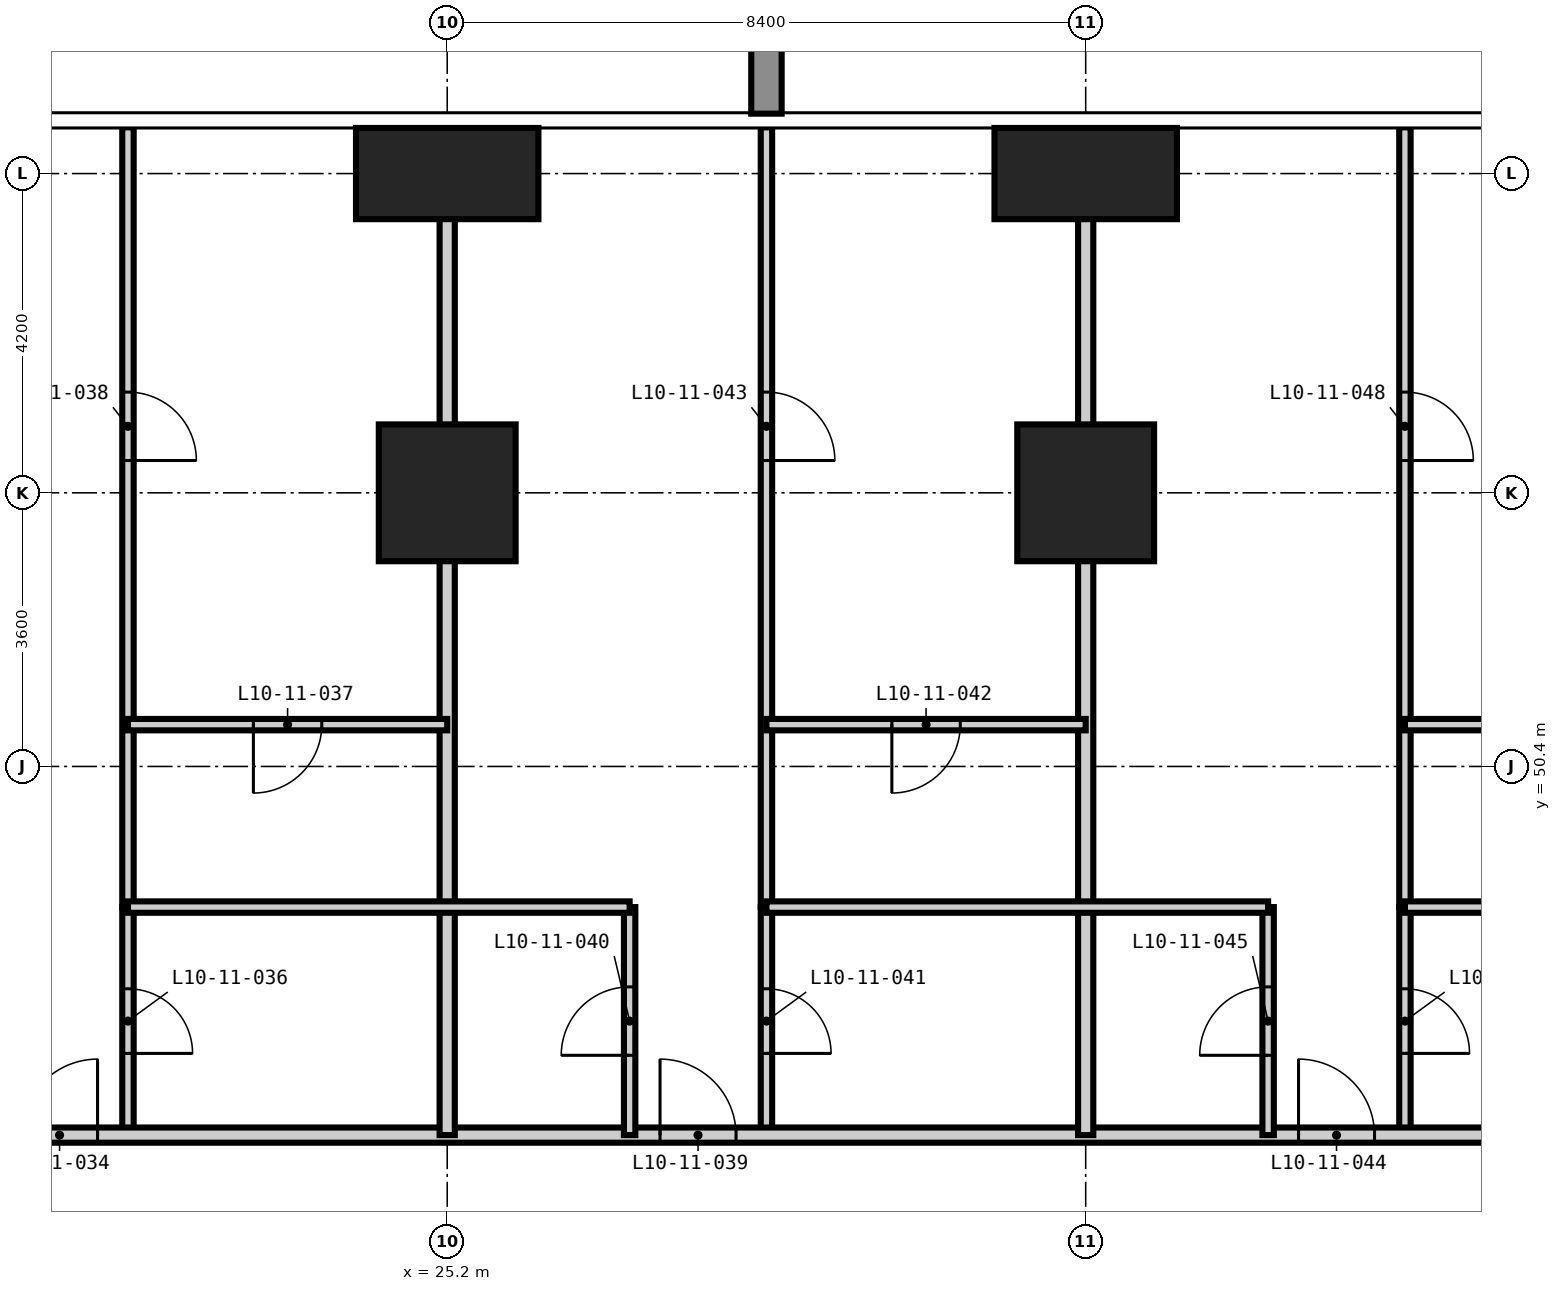
"""IFC4 building model, lengths in metres.
Left out: names, types, materials, properties, quantities, classifications, styles, units other than length and angle.
Written with IfcOpenShell. Run it as: python <this file> out.ifc"""

import sys

from ifc_helpers import new_model, si_unit, direction, frame, frame_2d, origin, origin_2d, place, context, subcontext, project, spatial, rectangle, extrude, element, fill, save


model = new_model("IFC4")
c1 = context("Model", 3, precision=1e-05, world=origin(), true_north=direction((0.0, 1.0)))
c2 = subcontext(c1, "Body", "Model", "MODEL_VIEW")
j1 = project(units=[si_unit("LENGTHUNIT", "METRE"), si_unit("PLANEANGLEUNIT", "RADIAN")], contexts=[c1])
p1 = place(None, origin())
s1 = spatial("IfcSite", under=j1, at=p1, CompositionType="ELEMENT")
p2 = place(p1, origin())
s2 = spatial("IfcBuilding", under=s1, at=p2, CompositionType="ELEMENT")
p3 = place(p2, frame((0.0, 0.0, 45.0)))
s3 = spatial("IfcBuildingStorey", under=s2, at=p3, CompositionType="ELEMENT", Elevation=45.0)
p4 = place(p3, frame((25.2, 54.0, -0.35), z_axis=(0.0, 0.0, 1.0), x_axis=(1.0, 0.0, 0.0)))
e1 = element("IfcColumn", 1, at=p4, inside=s3, PredefinedType="COLUMN", context=c2, shape_type="SweptSolid", body=[
    extrude(rectangle(XDim=1.8, YDim=1.8, at=origin_2d()), origin(), (0.0, 0.0, 1.0), 3.6),
])
p5 = place(p3, frame((25.2, 58.2, -0.35), z_axis=(0.0, 0.0, 1.0), x_axis=(1.0, 0.0, 0.0)))
e2 = element("IfcColumn", 2, at=p5, inside=s3, PredefinedType="COLUMN", context=c2, shape_type="SweptSolid", body=[
    extrude(rectangle(XDim=2.4, YDim=1.2, at=origin_2d()), origin(), (0.0, 0.0, 1.0), 3.6),
])
p6 = place(p3, frame((33.6, 54.0, -0.35), z_axis=(0.0, 0.0, 1.0), x_axis=(1.0, 0.0, 0.0)))
e3 = element("IfcColumn", 3, at=p6, inside=s3, PredefinedType="COLUMN", context=c2, shape_type="SweptSolid", body=[
    extrude(rectangle(XDim=1.8, YDim=1.8, at=origin_2d()), origin(), (0.0, 0.0, 1.0), 3.6),
])
p7 = place(p3, frame((33.6, 58.2, -0.35), z_axis=(0.0, 0.0, 1.0), x_axis=(1.0, 0.0, 0.0)))
e4 = element("IfcColumn", 4, at=p7, inside=s3, PredefinedType="COLUMN", context=c2, shape_type="SweptSolid", body=[
    extrude(rectangle(XDim=2.4, YDim=1.2, at=origin_2d()), origin(), (0.0, 0.0, 1.0), 3.6),
])
p8 = place(p3, frame((21.0, 45.55, 0.0), z_axis=(0.0, 0.0, 1.0), x_axis=(0.0, 1.0, 0.0)))
e5 = element("IfcWall", 5, at=p8, inside=s3, PredefinedType="PARTITIONING", context=c2, shape_type="SweptSolid", body=[
    extrude(rectangle(XDim=3.0, YDim=0.15, at=frame_2d((1.5, 0.0))), origin(), (0.0, 0.0, 1.0), 3.25),
])
p9 = place(p8, frame((1.075, 0.0, 0.0)))
e6 = element("IfcOpeningElement", 6, at=p9, cuts=e5, PredefinedType="OPENING", context=c2, shape_type="SweptSolid", body=[
    extrude(rectangle(XDim=0.85, YDim=2.1, at=frame_2d((0.425, 1.05))), frame((0.0, 0.085, 0.0), z_axis=(0.0, -1.0, 0.0), x_axis=(1.0, 0.0, 0.0)), (0.0, 0.0, 1.0), 0.17),
])
p10 = place(p3, frame((29.4, 45.55, 0.0), z_axis=(0.0, 0.0, 1.0), x_axis=(0.0, 1.0, 0.0)))
e7 = element("IfcWall", 7, at=p10, inside=s3, PredefinedType="PARTITIONING", context=c2, shape_type="SweptSolid", body=[
    extrude(rectangle(XDim=3.0, YDim=0.15, at=frame_2d((1.5, 0.0))), origin(), (0.0, 0.0, 1.0), 3.25),
])
p11 = place(p10, frame((1.075, 0.0, 0.0)))
e8 = element("IfcOpeningElement", 8, at=p11, cuts=e7, PredefinedType="OPENING", context=c2, shape_type="SweptSolid", body=[
    extrude(rectangle(XDim=0.85, YDim=2.1, at=frame_2d((0.425, 1.05))), frame((0.0, 0.085, 0.0), z_axis=(0.0, -1.0, 0.0), x_axis=(1.0, 0.0, 0.0)), (0.0, 0.0, 1.0), 0.17),
])
p12 = place(p3, frame((37.8, 45.55, 0.0), z_axis=(0.0, 0.0, 1.0), x_axis=(0.0, 1.0, 0.0)))
e9 = element("IfcWall", 9, at=p12, inside=s3, PredefinedType="PARTITIONING", context=c2, shape_type="SweptSolid", body=[
    extrude(rectangle(XDim=3.0, YDim=0.15, at=frame_2d((1.5, 0.0))), origin(), (0.0, 0.0, 1.0), 3.25),
])
p13 = place(p12, frame((1.075, 0.0, 0.0)))
e10 = element("IfcOpeningElement", 10, at=p13, cuts=e9, PredefinedType="OPENING", context=c2, shape_type="SweptSolid", body=[
    extrude(rectangle(XDim=0.85, YDim=2.1, at=frame_2d((0.425, 1.05))), frame((0.0, 0.085, 0.0), z_axis=(0.0, -1.0, 0.0), x_axis=(1.0, 0.0, 0.0)), (0.0, 0.0, 1.0), 0.17),
])
p14 = place(p3, frame((12.95, 45.55, 0.0), z_axis=(0.0, 0.0, 1.0), x_axis=(1.0, 0.0, 0.0)))
e11 = element("IfcWall", 11, at=p14, inside=s3, PredefinedType="PARTITIONING", context=c2, shape_type="SweptSolid", body=[
    extrude(rectangle(XDim=32.3, YDim=0.2, at=frame_2d((16.15, 0.0))), origin(), (0.0, 0.0, 1.0), 3.25),
])
p15 = place(p14, frame((6.65, 0.0, 0.0)))
e12 = element("IfcOpeningElement", 12, at=p15, cuts=e11, PredefinedType="OPENING", context=c2, shape_type="SweptSolid", body=[
    extrude(rectangle(XDim=1.0, YDim=2.2, at=frame_2d((0.5, 1.1))), frame((0.0, 0.11, 0.0), z_axis=(0.0, -1.0, 0.0), x_axis=(1.0, 0.0, 0.0)), (0.0, 0.0, 1.0), 0.22),
])
p16 = place(p14, frame((15.05, 0.0, 0.0)))
e13 = element("IfcOpeningElement", 13, at=p16, cuts=e11, PredefinedType="OPENING", context=c2, shape_type="SweptSolid", body=[
    extrude(rectangle(XDim=1.0, YDim=2.2, at=frame_2d((0.5, 1.1))), frame((0.0, 0.11, 0.0), z_axis=(0.0, -1.0, 0.0), x_axis=(1.0, 0.0, 0.0)), (0.0, 0.0, 1.0), 0.22),
])
p17 = place(p14, frame((23.45, 0.0, 0.0)))
e14 = element("IfcOpeningElement", 14, at=p17, cuts=e11, PredefinedType="OPENING", context=c2, shape_type="SweptSolid", body=[
    extrude(rectangle(XDim=1.0, YDim=2.2, at=frame_2d((0.5, 1.1))), frame((0.0, 0.11, 0.0), z_axis=(0.0, -1.0, 0.0), x_axis=(1.0, 0.0, 0.0)), (0.0, 0.0, 1.0), 0.22),
])
for number, where, z_axis, x_axis in (
    (15, (25.2, 45.55, 0.0), (0.0, 0.0, 1.0), (0.0, 1.0, 0.0)),
    (16, (33.6, 45.55, 0.0), (0.0, 0.0, 1.0), (0.0, 1.0, 0.0)),
):
    element("IfcWall", number, at=place(p3, frame(where, z_axis=z_axis, x_axis=x_axis)), inside=s3, PredefinedType="PARTITIONING", context=c2, shape_type="SweptSolid", body=[
        extrude(rectangle(XDim=13.258, YDim=0.2, at=frame_2d((6.629, 0.0))), origin(), (0.0, 0.0, 1.0), 3.25),
    ])
p18 = place(p3, frame((21.0, 48.55, 0.0), z_axis=(0.0, 0.0, 1.0), x_axis=(0.0, 1.0, 0.0)))
e17 = element("IfcWall", 17, at=p18, inside=s3, PredefinedType="PARTITIONING", context=c2, shape_type="SweptSolid", body=[
    extrude(rectangle(XDim=10.258, YDim=0.15, at=frame_2d((5.129, 0.0))), origin(), (0.0, 0.0, 1.0), 3.25),
])
p19 = place(p18, frame((5.875, 0.0, 0.0)))
e18 = element("IfcOpeningElement", 18, at=p19, cuts=e17, PredefinedType="OPENING", context=c2, shape_type="SweptSolid", body=[
    extrude(rectangle(XDim=0.9, YDim=2.1, at=frame_2d((0.45, 1.05))), frame((0.0, 0.085, 0.0), z_axis=(0.0, -1.0, 0.0), x_axis=(1.0, 0.0, 0.0)), (0.0, 0.0, 1.0), 0.17),
])
p20 = place(p3, frame((27.6, 45.55, 0.0), z_axis=(0.0, 0.0, 1.0), x_axis=(0.0, 1.0, 0.0)))
e19 = element("IfcWall", 19, at=p20, inside=s3, PredefinedType="PARTITIONING", context=c2, shape_type="SweptSolid", body=[
    extrude(rectangle(XDim=3.0, YDim=0.15, at=frame_2d((1.5, 0.0))), origin(), (0.0, 0.0, 1.0), 3.25),
])
p21 = place(p20, frame((1.05, 0.0, 0.0)))
e20 = element("IfcOpeningElement", 20, at=p21, cuts=e19, PredefinedType="OPENING", context=c2, shape_type="SweptSolid", body=[
    extrude(rectangle(XDim=0.9, YDim=2.1, at=frame_2d((0.45, 1.05))), frame((0.0, 0.085, 0.0), z_axis=(0.0, -1.0, 0.0), x_axis=(1.0, 0.0, 0.0)), (0.0, 0.0, 1.0), 0.17),
])
p22 = place(p3, frame((29.4, 48.55, 0.0), z_axis=(0.0, 0.0, 1.0), x_axis=(0.0, 1.0, 0.0)))
e21 = element("IfcWall", 21, at=p22, inside=s3, PredefinedType="PARTITIONING", context=c2, shape_type="SweptSolid", body=[
    extrude(rectangle(XDim=10.258, YDim=0.15, at=frame_2d((5.129, 0.0))), origin(), (0.0, 0.0, 1.0), 3.25),
])
p23 = place(p22, frame((5.875, 0.0, 0.0)))
e22 = element("IfcOpeningElement", 22, at=p23, cuts=e21, PredefinedType="OPENING", context=c2, shape_type="SweptSolid", body=[
    extrude(rectangle(XDim=0.9, YDim=2.1, at=frame_2d((0.45, 1.05))), frame((0.0, 0.085, 0.0), z_axis=(0.0, -1.0, 0.0), x_axis=(1.0, 0.0, 0.0)), (0.0, 0.0, 1.0), 0.17),
])
p24 = place(p3, frame((36.0, 45.55, 0.0), z_axis=(0.0, 0.0, 1.0), x_axis=(0.0, 1.0, 0.0)))
e23 = element("IfcWall", 23, at=p24, inside=s3, PredefinedType="PARTITIONING", context=c2, shape_type="SweptSolid", body=[
    extrude(rectangle(XDim=3.0, YDim=0.15, at=frame_2d((1.5, 0.0))), origin(), (0.0, 0.0, 1.0), 3.25),
])
p25 = place(p24, frame((1.05, 0.0, 0.0)))
e24 = element("IfcOpeningElement", 24, at=p25, cuts=e23, PredefinedType="OPENING", context=c2, shape_type="SweptSolid", body=[
    extrude(rectangle(XDim=0.9, YDim=2.1, at=frame_2d((0.45, 1.05))), frame((0.0, 0.085, 0.0), z_axis=(0.0, -1.0, 0.0), x_axis=(1.0, 0.0, 0.0)), (0.0, 0.0, 1.0), 0.17),
])
p26 = place(p3, frame((37.8, 48.55, 0.0), z_axis=(0.0, 0.0, 1.0), x_axis=(0.0, 1.0, 0.0)))
e25 = element("IfcWall", 25, at=p26, inside=s3, PredefinedType="PARTITIONING", context=c2, shape_type="SweptSolid", body=[
    extrude(rectangle(XDim=10.258, YDim=0.15, at=frame_2d((5.129, 0.0))), origin(), (0.0, 0.0, 1.0), 3.25),
])
p27 = place(p26, frame((5.875, 0.0, 0.0)))
e26 = element("IfcOpeningElement", 26, at=p27, cuts=e25, PredefinedType="OPENING", context=c2, shape_type="SweptSolid", body=[
    extrude(rectangle(XDim=0.9, YDim=2.1, at=frame_2d((0.45, 1.05))), frame((0.0, 0.085, 0.0), z_axis=(0.0, -1.0, 0.0), x_axis=(1.0, 0.0, 0.0)), (0.0, 0.0, 1.0), 0.17),
])
for number, where, z_axis, x_axis in (
    (27, (21.0, 48.55, 0.0), (0.0, 0.0, 1.0), (1.0, 0.0, 0.0)),
    (28, (29.4, 48.55, 0.0), (0.0, 0.0, 1.0), (1.0, 0.0, 0.0)),
):
    element("IfcWall", number, at=place(p3, frame(where, z_axis=z_axis, x_axis=x_axis)), inside=s3, PredefinedType="PARTITIONING", context=c2, shape_type="SweptSolid", body=[
        extrude(rectangle(XDim=6.6, YDim=0.15, at=frame_2d((3.3, 0.0))), origin(), (0.0, 0.0, 1.0), 3.25),
    ])
p28 = place(p3, frame((37.8, 48.55, 0.0), z_axis=(0.0, 0.0, 1.0), x_axis=(1.0, 0.0, 0.0)))
e29 = element("IfcWall", 29, at=p28, inside=s3, PredefinedType="PARTITIONING", context=c2, shape_type="SweptSolid", body=[
    extrude(rectangle(XDim=4.2, YDim=0.15, at=frame_2d((2.1, 0.0))), origin(), (0.0, 0.0, 1.0), 3.25),
])
p29 = place(p3, frame((21.0, 50.95, 0.0), z_axis=(0.0, 0.0, 1.0), x_axis=(1.0, 0.0, 0.0)))
e30 = element("IfcWall", 30, at=p29, inside=s3, PredefinedType="PARTITIONING", context=c2, shape_type="SweptSolid", body=[
    extrude(rectangle(XDim=4.2, YDim=0.15, at=frame_2d((2.1, 0.0))), origin(), (0.0, 0.0, 1.0), 3.25),
])
p30 = place(p29, frame((1.65, 0.0, 0.0)))
e31 = element("IfcOpeningElement", 31, at=p30, cuts=e30, PredefinedType="OPENING", context=c2, shape_type="SweptSolid", body=[
    extrude(rectangle(XDim=0.9, YDim=2.1, at=frame_2d((0.45, 1.05))), frame((0.0, 0.085, 0.0), z_axis=(0.0, -1.0, 0.0), x_axis=(1.0, 0.0, 0.0)), (0.0, 0.0, 1.0), 0.17),
])
p31 = place(p3, frame((29.4, 50.95, 0.0), z_axis=(0.0, 0.0, 1.0), x_axis=(1.0, 0.0, 0.0)))
e32 = element("IfcWall", 32, at=p31, inside=s3, PredefinedType="PARTITIONING", context=c2, shape_type="SweptSolid", body=[
    extrude(rectangle(XDim=4.2, YDim=0.15, at=frame_2d((2.1, 0.0))), origin(), (0.0, 0.0, 1.0), 3.25),
])
p32 = place(p31, frame((1.65, 0.0, 0.0)))
e33 = element("IfcOpeningElement", 33, at=p32, cuts=e32, PredefinedType="OPENING", context=c2, shape_type="SweptSolid", body=[
    extrude(rectangle(XDim=0.9, YDim=2.1, at=frame_2d((0.45, 1.05))), frame((0.0, 0.085, 0.0), z_axis=(0.0, -1.0, 0.0), x_axis=(1.0, 0.0, 0.0)), (0.0, 0.0, 1.0), 0.17),
])
p33 = place(p3, frame((37.8, 50.95, 0.0), z_axis=(0.0, 0.0, 1.0), x_axis=(1.0, 0.0, 0.0)))
e34 = element("IfcWall", 34, at=p33, inside=s3, PredefinedType="PARTITIONING", context=c2, shape_type="SweptSolid", body=[
    extrude(rectangle(XDim=4.2, YDim=0.15, at=frame_2d((2.1, 0.0))), origin(), (0.0, 0.0, 1.0), 3.25),
])
p34 = place(p33, frame((1.65, 0.0, 0.0)))
e35 = element("IfcOpeningElement", 35, at=p34, cuts=e34, PredefinedType="OPENING", context=c2, shape_type="SweptSolid", body=[
    extrude(rectangle(XDim=0.9, YDim=2.1, at=frame_2d((0.45, 1.05))), frame((0.0, 0.085, 0.0), z_axis=(0.0, -1.0, 0.0), x_axis=(1.0, 0.0, 0.0)), (0.0, 0.0, 1.0), 0.17),
])
p35 = place(p15, origin())
e36 = element("IfcDoor", 36, at=p35, inside=s3, OperationType="SINGLE_SWING_RIGHT", PredefinedType="DOOR", context=c2, shape_type="SweptSolid", body=[
    extrude(rectangle(XDim=1.0, YDim=2.2, at=frame_2d((0.5, 1.1))), frame((0.0, 0.025, 0.0), z_axis=(0.0, -1.0, 0.0), x_axis=(1.0, 0.0, 0.0)), (0.0, 0.0, 1.0), 0.05),
])
fill(e12, e36)
p36 = place(p9, frame((0.85, 0.0, 0.0), z_axis=(0.0, 0.0, 1.0), x_axis=(-1.0, 0.0, 0.0)))
e37 = element("IfcDoor", 37, at=p36, inside=s3, OperationType="SINGLE_SWING_RIGHT", PredefinedType="DOOR", context=c2, shape_type="SweptSolid", body=[
    extrude(rectangle(XDim=0.85, YDim=2.1, at=frame_2d((0.425, 1.05))), frame((0.0, 0.025, 0.0), z_axis=(0.0, -1.0, 0.0), x_axis=(1.0, 0.0, 0.0)), (0.0, 0.0, 1.0), 0.05),
])
fill(e6, e37)
p37 = place(p30, frame((0.9, 0.0, 0.0), z_axis=(0.0, 0.0, 1.0), x_axis=(-1.0, 0.0, 0.0)))
e38 = element("IfcDoor", 38, at=p37, inside=s3, OperationType="SINGLE_SWING_RIGHT", PredefinedType="DOOR", context=c2, shape_type="SweptSolid", body=[
    extrude(rectangle(XDim=0.9, YDim=2.1, at=frame_2d((0.45, 1.05))), frame((0.0, 0.025, 0.0), z_axis=(0.0, -1.0, 0.0), x_axis=(1.0, 0.0, 0.0)), (0.0, 0.0, 1.0), 0.05),
])
fill(e31, e38)
p38 = place(p19, frame((0.9, 0.0, 0.0), z_axis=(0.0, 0.0, 1.0), x_axis=(-1.0, 0.0, 0.0)))
e39 = element("IfcDoor", 39, at=p38, inside=s3, OperationType="SINGLE_SWING_RIGHT", PredefinedType="DOOR", context=c2, shape_type="SweptSolid", body=[
    extrude(rectangle(XDim=0.9, YDim=2.1, at=frame_2d((0.45, 1.05))), frame((0.0, 0.025, 0.0), z_axis=(0.0, -1.0, 0.0), x_axis=(1.0, 0.0, 0.0)), (0.0, 0.0, 1.0), 0.05),
])
fill(e18, e39)
p39 = place(p16, origin())
e40 = element("IfcDoor", 40, at=p39, inside=s3, OperationType="SINGLE_SWING_LEFT", PredefinedType="DOOR", context=c2, shape_type="SweptSolid", body=[
    extrude(rectangle(XDim=1.0, YDim=2.2, at=frame_2d((0.5, 1.1))), frame((0.0, 0.025, 0.0), z_axis=(0.0, -1.0, 0.0), x_axis=(1.0, 0.0, 0.0)), (0.0, 0.0, 1.0), 0.05),
])
fill(e13, e40)
p40 = place(p21, origin())
e41 = element("IfcDoor", 41, at=p40, inside=s3, OperationType="SINGLE_SWING_LEFT", PredefinedType="DOOR", context=c2, shape_type="SweptSolid", body=[
    extrude(rectangle(XDim=0.9, YDim=2.1, at=frame_2d((0.45, 1.05))), frame((0.0, 0.025, 0.0), z_axis=(0.0, -1.0, 0.0), x_axis=(1.0, 0.0, 0.0)), (0.0, 0.0, 1.0), 0.05),
])
fill(e20, e41)
p41 = place(p11, frame((0.85, 0.0, 0.0), z_axis=(0.0, 0.0, 1.0), x_axis=(-1.0, 0.0, 0.0)))
e42 = element("IfcDoor", 42, at=p41, inside=s3, OperationType="SINGLE_SWING_RIGHT", PredefinedType="DOOR", context=c2, shape_type="SweptSolid", body=[
    extrude(rectangle(XDim=0.85, YDim=2.1, at=frame_2d((0.425, 1.05))), frame((0.0, 0.025, 0.0), z_axis=(0.0, -1.0, 0.0), x_axis=(1.0, 0.0, 0.0)), (0.0, 0.0, 1.0), 0.05),
])
fill(e8, e42)
p42 = place(p32, frame((0.9, 0.0, 0.0), z_axis=(0.0, 0.0, 1.0), x_axis=(-1.0, 0.0, 0.0)))
e43 = element("IfcDoor", 43, at=p42, inside=s3, OperationType="SINGLE_SWING_RIGHT", PredefinedType="DOOR", context=c2, shape_type="SweptSolid", body=[
    extrude(rectangle(XDim=0.9, YDim=2.1, at=frame_2d((0.45, 1.05))), frame((0.0, 0.025, 0.0), z_axis=(0.0, -1.0, 0.0), x_axis=(1.0, 0.0, 0.0)), (0.0, 0.0, 1.0), 0.05),
])
fill(e33, e43)
p43 = place(p23, frame((0.9, 0.0, 0.0), z_axis=(0.0, 0.0, 1.0), x_axis=(-1.0, 0.0, 0.0)))
e44 = element("IfcDoor", 44, at=p43, inside=s3, OperationType="SINGLE_SWING_RIGHT", PredefinedType="DOOR", context=c2, shape_type="SweptSolid", body=[
    extrude(rectangle(XDim=0.9, YDim=2.1, at=frame_2d((0.45, 1.05))), frame((0.0, 0.025, 0.0), z_axis=(0.0, -1.0, 0.0), x_axis=(1.0, 0.0, 0.0)), (0.0, 0.0, 1.0), 0.05),
])
fill(e22, e44)
p44 = place(p17, origin())
e45 = element("IfcDoor", 45, at=p44, inside=s3, OperationType="SINGLE_SWING_LEFT", PredefinedType="DOOR", context=c2, shape_type="SweptSolid", body=[
    extrude(rectangle(XDim=1.0, YDim=2.2, at=frame_2d((0.5, 1.1))), frame((0.0, 0.025, 0.0), z_axis=(0.0, -1.0, 0.0), x_axis=(1.0, 0.0, 0.0)), (0.0, 0.0, 1.0), 0.05),
])
fill(e14, e45)
p45 = place(p25, origin())
e46 = element("IfcDoor", 46, at=p45, inside=s3, OperationType="SINGLE_SWING_LEFT", PredefinedType="DOOR", context=c2, shape_type="SweptSolid", body=[
    extrude(rectangle(XDim=0.9, YDim=2.1, at=frame_2d((0.45, 1.05))), frame((0.0, 0.025, 0.0), z_axis=(0.0, -1.0, 0.0), x_axis=(1.0, 0.0, 0.0)), (0.0, 0.0, 1.0), 0.05),
])
fill(e24, e46)
p46 = place(p13, frame((0.85, 0.0, 0.0), z_axis=(0.0, 0.0, 1.0), x_axis=(-1.0, 0.0, 0.0)))
e47 = element("IfcDoor", 47, at=p46, inside=s3, OperationType="SINGLE_SWING_RIGHT", PredefinedType="DOOR", context=c2, shape_type="SweptSolid", body=[
    extrude(rectangle(XDim=0.85, YDim=2.1, at=frame_2d((0.425, 1.05))), frame((0.0, 0.025, 0.0), z_axis=(0.0, -1.0, 0.0), x_axis=(1.0, 0.0, 0.0)), (0.0, 0.0, 1.0), 0.05),
])
fill(e10, e47)
p47 = place(p27, frame((0.9, 0.0, 0.0), z_axis=(0.0, 0.0, 1.0), x_axis=(-1.0, 0.0, 0.0)))
e48 = element("IfcDoor", 48, at=p47, inside=s3, OperationType="SINGLE_SWING_RIGHT", PredefinedType="DOOR", context=c2, shape_type="SweptSolid", body=[
    extrude(rectangle(XDim=0.9, YDim=2.1, at=frame_2d((0.45, 1.05))), frame((0.0, 0.025, 0.0), z_axis=(0.0, -1.0, 0.0), x_axis=(1.0, 0.0, 0.0)), (0.0, 0.0, 1.0), 0.05),
])
fill(e26, e48)
save(model, sys.argv[1])
